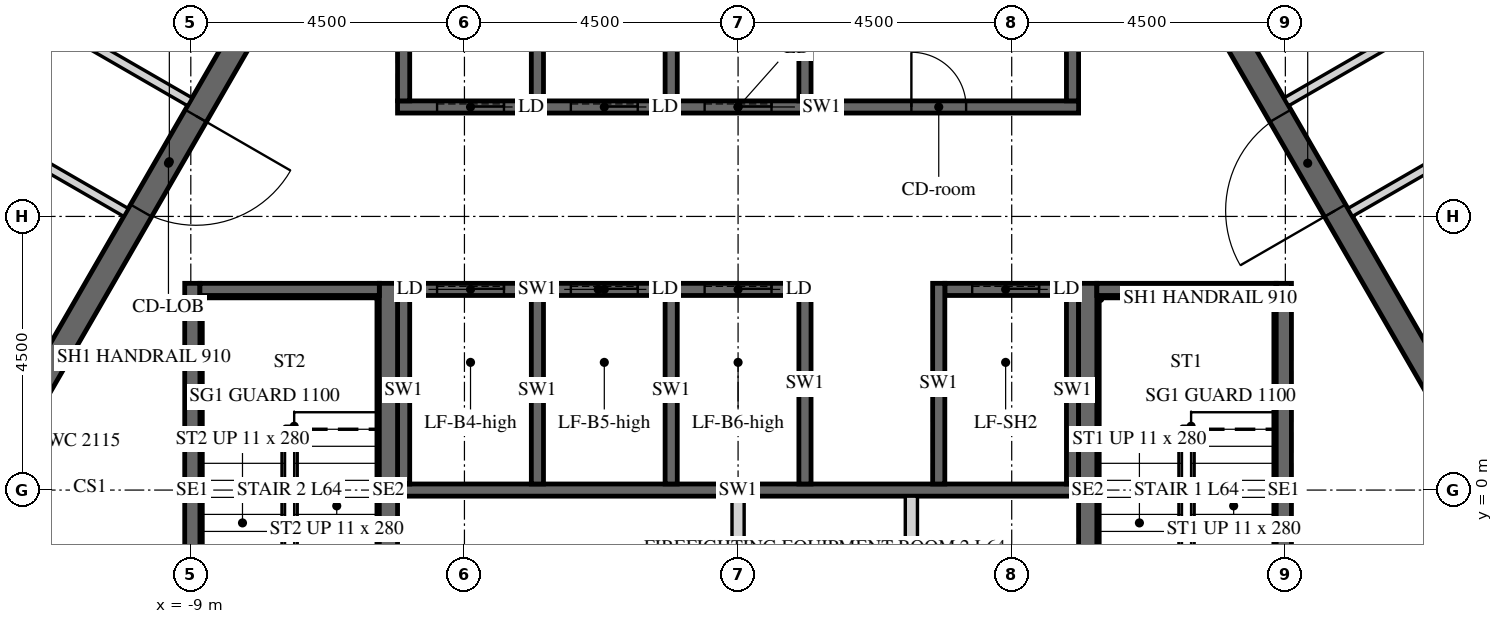
"""IFC4 building model, lengths in metres.
Left out: names, types, materials, properties, quantities, classifications, styles, units other than length and angle.
Written with IfcOpenShell. Run it as: python <this file> out.ifc"""

import sys

from ifc_helpers import new_model, si_unit, direction, frame, frame_2d, origin, place, context, subcontext, project, spatial, polyline, rectangle, outline, extrude, element, fill, save


model = new_model("IFC4")
c1 = context("Model", 3, precision=1e-05, world=origin(), true_north=direction((0.0, 1.0)))
c2 = subcontext(c1, "Body", "Model", "MODEL_VIEW")
j1 = project(units=[si_unit("LENGTHUNIT", "METRE"), si_unit("PLANEANGLEUNIT", "RADIAN")], contexts=[c1])
p1 = place(None, origin())
s1 = spatial("IfcSite", under=j1, at=p1, CompositionType="ELEMENT")
p2 = place(p1, origin())
s2 = spatial("IfcBuilding", under=s1, at=p2, CompositionType="ELEMENT")
p3 = place(p2, frame((0.0, 0.0, 267.9)))
s3 = spatial("IfcBuildingStorey", under=s2, at=p3, CompositionType="ELEMENT", Elevation=267.9)
p4 = place(p3, frame((-6.235, 10.8, -0.15), z_axis=(0.0, 0.0, 1.0), x_axis=(-0.499996419489, -0.866027470984, 0.0)))
e1 = element("IfcWall", 1, at=p4, inside=s3, PredefinedType="SHEAR", context=c2, shape_type="SweptSolid", body=[
    extrude(outline(polyline([(-0.115, -0.2), (12.586, -0.2), (12.355, 0.2), (0.115, 0.2), (-0.115, -0.2)])), origin(), (0.0, 0.0, 1.0), 3.9),
])
p5 = place(p4, frame((5.364, 0.0, 0.15)))
e2 = element("IfcOpeningElement", 2, at=p5, cuts=e1, PredefinedType="OPENING", context=c2, shape_type="SweptSolid", body=[
    extrude(rectangle(XDim=1.8, YDim=2.4, at=frame_2d((0.9, 1.2))), frame((0.0, 0.21, 0.0), z_axis=(0.0, -1.0, 0.0), x_axis=(1.0, 0.0, 0.0)), (0.0, 0.0, 1.0), 0.42),
])
p6 = place(p3, frame((-12.471, 0.0, -0.15), z_axis=(0.0, 0.0, 1.0), x_axis=(0.499996419489, -0.866027470984, 0.0)))
e3 = element("IfcWall", 3, at=p6, inside=s3, PredefinedType="SHEAR", context=c2, shape_type="SweptSolid", body=[
    extrude(outline(polyline([(-0.115, -0.2), (12.586, -0.2), (12.355, 0.2), (0.115, 0.2), (-0.115, -0.2)])), origin(), (0.0, 0.0, 1.0), 3.9),
])
p7 = place(p6, frame((5.306, 0.0, 0.15)))
e4 = element("IfcOpeningElement", 4, at=p7, cuts=e3, PredefinedType="OPENING", context=c2, shape_type="SweptSolid", body=[
    extrude(rectangle(XDim=1.8, YDim=2.4, at=frame_2d((0.9, 1.2))), frame((0.0, 0.21, 0.0), z_axis=(0.0, -1.0, 0.0), x_axis=(1.0, 0.0, 0.0)), (0.0, 0.0, 1.0), 0.42),
])
p8 = place(p3, frame((6.235, -10.8, -0.15), z_axis=(0.0, 0.0, 1.0), x_axis=(0.499996419489, 0.866027470984, 0.0)))
e5 = element("IfcWall", 5, at=p8, inside=s3, PredefinedType="SHEAR", context=c2, shape_type="SweptSolid", body=[
    extrude(outline(polyline([(-0.115, -0.2), (12.586, -0.2), (12.355, 0.2), (0.115, 0.2), (-0.115, -0.2)])), origin(), (0.0, 0.0, 1.0), 3.9),
])
p9 = place(p8, frame((5.364, 0.0, 0.15)))
e6 = element("IfcOpeningElement", 6, at=p9, cuts=e5, PredefinedType="OPENING", context=c2, shape_type="SweptSolid", body=[
    extrude(rectangle(XDim=1.8, YDim=2.4, at=frame_2d((0.9, 1.2))), frame((0.0, 0.21, 0.0), z_axis=(0.0, -1.0, 0.0), x_axis=(1.0, 0.0, 0.0)), (0.0, 0.0, 1.0), 0.42),
])
p10 = place(p3, frame((12.471, 0.0, -0.15), z_axis=(0.0, 0.0, 1.0), x_axis=(-0.499996419489, 0.866027470984, 0.0)))
e7 = element("IfcWall", 7, at=p10, inside=s3, PredefinedType="SHEAR", context=c2, shape_type="SweptSolid", body=[
    extrude(outline(polyline([(-0.115, -0.2), (12.586, -0.2), (12.355, 0.2), (0.115, 0.2), (-0.115, -0.2)])), origin(), (0.0, 0.0, 1.0), 3.9),
])
p11 = place(p10, frame((5.306, 0.0, 0.15)))
e8 = element("IfcOpeningElement", 8, at=p11, cuts=e7, PredefinedType="OPENING", context=c2, shape_type="SweptSolid", body=[
    extrude(rectangle(XDim=1.8, YDim=2.4, at=frame_2d((0.9, 1.2))), frame((0.0, 0.21, 0.0), z_axis=(0.0, -1.0, 0.0), x_axis=(1.0, 0.0, 0.0)), (0.0, 0.0, 1.0), 0.42),
])
p12 = place(p3, frame((-5.6, 6.3, -0.25), z_axis=(0.0, 0.0, 1.0), x_axis=(1.0, 0.0, 0.0)))
e9 = element("IfcWall", 9, at=p12, inside=s3, PredefinedType="SHEAR", context=c2, shape_type="SweptSolid", body=[
    extrude(rectangle(XDim=11.2, YDim=0.2, at=frame_2d((5.6, 0.0))), origin(), (0.0, 0.0, 1.0), 3.9),
])
p13 = place(p12, frame((8.45, 0.0, 0.25)))
e10 = element("IfcOpeningElement", 10, at=p13, cuts=e9, PredefinedType="OPENING", context=c2, shape_type="SweptSolid", body=[
    extrude(rectangle(XDim=0.9, YDim=2.1, at=frame_2d((0.45, 1.05))), frame((0.0, 0.11, 0.0), z_axis=(0.0, -1.0, 0.0), x_axis=(1.0, 0.0, 0.0)), (0.0, 0.0, 1.0), 0.22),
])
p14 = place(p12, frame((0.65, 0.0, 0.25)))
e11 = element("IfcOpeningElement", 11, at=p14, cuts=e9, PredefinedType="OPENING", context=c2, shape_type="SweptSolid", body=[
    extrude(rectangle(XDim=1.1, YDim=2.1, at=frame_2d((0.55, 1.05))), frame((0.0, 0.11, 0.0), z_axis=(0.0, -1.0, 0.0), x_axis=(1.0, 0.0, 0.0)), (0.0, 0.0, 1.0), 0.22),
])
p15 = place(p12, frame((2.85, 0.0, 0.25)))
e12 = element("IfcOpeningElement", 12, at=p15, cuts=e9, PredefinedType="OPENING", context=c2, shape_type="SweptSolid", body=[
    extrude(rectangle(XDim=1.1, YDim=2.1, at=frame_2d((0.55, 1.05))), frame((0.0, 0.11, 0.0), z_axis=(0.0, -1.0, 0.0), x_axis=(1.0, 0.0, 0.0)), (0.0, 0.0, 1.0), 0.22),
])
p16 = place(p12, frame((5.05, 0.0, 0.25)))
e13 = element("IfcOpeningElement", 13, at=p16, cuts=e9, PredefinedType="OPENING", context=c2, shape_type="SweptSolid", body=[
    extrude(rectangle(XDim=1.1, YDim=2.1, at=frame_2d((0.55, 1.05))), frame((0.0, 0.11, 0.0), z_axis=(0.0, -1.0, 0.0), x_axis=(1.0, 0.0, 0.0)), (0.0, 0.0, 1.0), 0.22),
])
for number, where, z_axis, x_axis in (
    (14, (-5.5, 6.4, -0.25), (0.0, 0.0, 1.0), (0.0, 1.0, 0.0)),
    (15, (-3.3, 6.4, -0.25), (0.0, 0.0, 1.0), (0.0, 1.0, 0.0)),
    (16, (-1.1, 6.4, -0.25), (0.0, 0.0, 1.0), (0.0, 1.0, 0.0)),
    (17, (1.1, 6.4, -0.25), (0.0, 0.0, 1.0), (0.0, 1.0, 0.0)),
    (18, (5.5, 6.4, -0.25), (0.0, 0.0, 1.0), (0.0, 1.0, 0.0)),
):
    element("IfcWall", number, at=place(p3, frame(where, z_axis=z_axis, x_axis=x_axis)), inside=s3, PredefinedType="SHEAR", context=c2, shape_type="SweptSolid", body=[
        extrude(rectangle(XDim=2.9, YDim=0.2, at=frame_2d((1.45, 0.0))), origin(), (0.0, 0.0, 1.0), 3.9),
    ])
p17 = place(p3, frame((-5.6, 3.3, -0.25), z_axis=(0.0, 0.0, 1.0), x_axis=(1.0, 0.0, 0.0)))
e19 = element("IfcWall", 19, at=p17, inside=s3, PredefinedType="SHEAR", context=c2, shape_type="SweptSolid", body=[
    extrude(rectangle(XDim=6.6, YDim=0.2, at=frame_2d((3.3, 0.0))), origin(), (0.0, 0.0, 1.0), 3.9),
])
p18 = place(p17, frame((0.65, 0.0, 0.25)))
e20 = element("IfcOpeningElement", 20, at=p18, cuts=e19, PredefinedType="OPENING", context=c2, shape_type="SweptSolid", body=[
    extrude(rectangle(XDim=1.1, YDim=2.1, at=frame_2d((0.55, 1.05))), frame((0.0, 0.11, 0.0), z_axis=(0.0, -1.0, 0.0), x_axis=(1.0, 0.0, 0.0)), (0.0, 0.0, 1.0), 0.22),
])
p19 = place(p17, frame((2.85, 0.0, 0.25)))
e21 = element("IfcOpeningElement", 21, at=p19, cuts=e19, PredefinedType="OPENING", context=c2, shape_type="SweptSolid", body=[
    extrude(rectangle(XDim=1.1, YDim=2.1, at=frame_2d((0.55, 1.05))), frame((0.0, 0.11, 0.0), z_axis=(0.0, -1.0, 0.0), x_axis=(1.0, 0.0, 0.0)), (0.0, 0.0, 1.0), 0.22),
])
p20 = place(p17, frame((5.05, 0.0, 0.25)))
e22 = element("IfcOpeningElement", 22, at=p20, cuts=e19, PredefinedType="OPENING", context=c2, shape_type="SweptSolid", body=[
    extrude(rectangle(XDim=1.1, YDim=2.1, at=frame_2d((0.55, 1.05))), frame((0.0, 0.11, 0.0), z_axis=(0.0, -1.0, 0.0), x_axis=(1.0, 0.0, 0.0)), (0.0, 0.0, 1.0), 0.22),
])
p21 = place(p3, frame((3.4, 3.3, -0.25), z_axis=(0.0, 0.0, 1.0), x_axis=(1.0, 0.0, 0.0)))
e23 = element("IfcWall", 23, at=p21, inside=s3, PredefinedType="SHEAR", context=c2, shape_type="SweptSolid", body=[
    extrude(rectangle(XDim=2.2, YDim=0.2, at=frame_2d((1.1, 0.0))), origin(), (0.0, 0.0, 1.0), 3.9),
])
p22 = place(p21, frame((0.45, 0.0, 0.25)))
e24 = element("IfcOpeningElement", 24, at=p22, cuts=e23, PredefinedType="OPENING", context=c2, shape_type="SweptSolid", body=[
    extrude(rectangle(XDim=1.1, YDim=2.1, at=frame_2d((0.55, 1.05))), frame((0.0, 0.11, 0.0), z_axis=(0.0, -1.0, 0.0), x_axis=(1.0, 0.0, 0.0)), (0.0, 0.0, 1.0), 0.22),
])
p23 = place(p3, frame((-5.6, 0.0, -0.25), z_axis=(0.0, 0.0, 1.0), x_axis=(1.0, 0.0, 0.0)))
e25 = element("IfcWall", 25, at=p23, inside=s3, PredefinedType="SHEAR", context=c2, shape_type="SweptSolid", body=[
    extrude(rectangle(XDim=11.2, YDim=0.2, at=frame_2d((5.6, 0.0))), origin(), (0.0, 0.0, 1.0), 3.9),
])
for number, where, z_axis, x_axis in (
    (26, (-5.5, 0.1, -0.25), (0.0, 0.0, 1.0), (0.0, 1.0, 0.0)),
    (27, (-3.3, 0.1, -0.25), (0.0, 0.0, 1.0), (0.0, 1.0, 0.0)),
    (28, (-1.1, 0.1, -0.25), (0.0, 0.0, 1.0), (0.0, 1.0, 0.0)),
):
    element("IfcWall", number, at=place(p3, frame(where, z_axis=z_axis, x_axis=x_axis)), inside=s3, PredefinedType="SHEAR", context=c2, shape_type="SweptSolid", body=[
        extrude(rectangle(XDim=3.1, YDim=0.2, at=frame_2d((1.55, 0.0))), origin(), (0.0, 0.0, 1.0), 3.9),
    ])
for number, where, z_axis, x_axis in (
    (29, (1.1, 0.1, -0.25), (0.0, 0.0, 1.0), (0.0, 1.0, 0.0)),
    (30, (3.3, 0.1, -0.25), (0.0, 0.0, 1.0), (0.0, 1.0, 0.0)),
):
    element("IfcWall", number, at=place(p3, frame(where, z_axis=z_axis, x_axis=x_axis)), inside=s3, PredefinedType="SHEAR", context=c2, shape_type="SweptSolid", body=[
        extrude(rectangle(XDim=3.3, YDim=0.2, at=frame_2d((1.65, 0.0))), origin(), (0.0, 0.0, 1.0), 3.9),
    ])
p24 = place(p3, frame((5.5, 0.1, -0.25), z_axis=(0.0, 0.0, 1.0), x_axis=(0.0, 1.0, 0.0)))
e31 = element("IfcWall", 31, at=p24, inside=s3, PredefinedType="SHEAR", context=c2, shape_type="SweptSolid", body=[
    extrude(rectangle(XDim=3.1, YDim=0.2, at=frame_2d((1.55, 0.0))), origin(), (0.0, 0.0, 1.0), 3.9),
])
p25 = place(p3, frame((2.85, -3.2, 0.0), z_axis=(0.0, 0.0, 1.0), x_axis=(0.0, 1.0, 0.0)))
e32 = element("IfcWall", 32, at=p25, inside=s3, PredefinedType="PARTITIONING", context=c2, shape_type="SweptSolid", body=[
    extrude(rectangle(XDim=3.1, YDim=0.2, at=frame_2d((1.55, 0.0))), origin(), (0.0, 0.0, 1.0), 3.65),
])
p26 = place(p3, frame((0.0, -6.2, 0.0), z_axis=(0.0, 0.0, 1.0), x_axis=(0.0, 1.0, 0.0)))
e33 = element("IfcWall", 33, at=p26, inside=s3, PredefinedType="PARTITIONING", context=c2, shape_type="SweptSolid", body=[
    extrude(rectangle(XDim=6.1, YDim=0.2, at=frame_2d((3.05, 0.0))), origin(), (0.0, 0.0, 1.0), 3.65),
])
p27 = place(p3, frame((5.75, -3.4, -0.25), z_axis=(0.0, 0.0, 1.0), x_axis=(0.0, 1.0, 0.0)))
e34 = element("IfcWall", 34, at=p27, inside=s3, PredefinedType="SHEAR", context=c2, shape_type="SweptSolid", body=[
    extrude(rectangle(XDim=6.8, YDim=0.3, at=frame_2d((3.4, 0.0))), origin(), (0.0, 0.0, 1.0), 3.9),
])
p28 = place(p3, frame((8.975, -3.4, -0.25), z_axis=(0.0, 0.0, 1.0), x_axis=(0.0, 1.0, 0.0)))
e35 = element("IfcWall", 35, at=p28, inside=s3, PredefinedType="SHEAR", context=c2, shape_type="SweptSolid", body=[
    extrude(rectangle(XDim=6.8, YDim=0.25, at=frame_2d((3.4, 0.0))), origin(), (0.0, 0.0, 1.0), 3.9),
])
p29 = place(p3, frame((5.9, 3.3, -0.25), z_axis=(0.0, 0.0, 1.0), x_axis=(1.0, 0.0, 0.0)))
e36 = element("IfcWall", 36, at=p29, inside=s3, PredefinedType="SHEAR", context=c2, shape_type="SweptSolid", body=[
    extrude(rectangle(XDim=2.95, YDim=0.2, at=frame_2d((1.475, 0.0))), origin(), (0.0, 0.0, 1.0), 3.9),
])
p30 = place(p3, frame((-5.75, -3.4, -0.25), z_axis=(0.0, 0.0, 1.0), x_axis=(0.0, 1.0, 0.0)))
e37 = element("IfcWall", 37, at=p30, inside=s3, PredefinedType="SHEAR", context=c2, shape_type="SweptSolid", body=[
    extrude(rectangle(XDim=6.8, YDim=0.3, at=frame_2d((3.4, 0.0))), origin(), (0.0, 0.0, 1.0), 3.9),
])
p31 = place(p3, frame((-8.975, -3.4, -0.25), z_axis=(0.0, 0.0, 1.0), x_axis=(0.0, 1.0, 0.0)))
e38 = element("IfcWall", 38, at=p31, inside=s3, PredefinedType="SHEAR", context=c2, shape_type="SweptSolid", body=[
    extrude(rectangle(XDim=6.8, YDim=0.25, at=frame_2d((3.4, 0.0))), origin(), (0.0, 0.0, 1.0), 3.9),
])
p32 = place(p3, frame((-8.85, 3.3, -0.25), z_axis=(0.0, 0.0, 1.0), x_axis=(1.0, 0.0, 0.0)))
e39 = element("IfcWall", 39, at=p32, inside=s3, PredefinedType="SHEAR", context=c2, shape_type="SweptSolid", body=[
    extrude(rectangle(XDim=2.95, YDim=0.2, at=frame_2d((1.475, 0.0))), origin(), (0.0, 0.0, 1.0), 3.9),
])
p33 = place(p3, frame((-8.434, 16.925, 0.0), z_axis=(0.0, 0.0, 1.0), x_axis=(-0.438371383278, -0.898793930956, 0.0)))
e40 = element("IfcWall", 40, at=p33, inside=s3, PredefinedType="PARTITIONING", context=c2, shape_type="SweptSolid", body=[
    extrude(rectangle(XDim=16.939, YDim=0.15, at=frame_2d((8.47, 0.0))), origin(), (0.0, 0.0, 1.0), 2.988),
])
p34 = place(p33, frame((3.89, 0.0, 0.0)))
e41 = element("IfcOpeningElement", 41, at=p34, cuts=e40, PredefinedType="OPENING", context=c2, shape_type="SweptSolid", body=[
    extrude(rectangle(XDim=1.0, YDim=2.1, at=frame_2d((0.5, 1.05))), frame((0.0, 0.085, 0.0), z_axis=(0.0, -1.0, 0.0), x_axis=(1.0, 0.0, 0.0)), (0.0, 0.0, 1.0), 0.17),
])
p35 = place(p3, frame((-9.016, 6.384, 0.0), z_axis=(0.0, 0.0, 1.0), x_axis=(-0.866031051173, 0.499990218309, 0.0)))
e42 = element("IfcWall", 42, at=p35, inside=s3, PredefinedType="PARTITIONING", context=c2, shape_type="SweptSolid", body=[
    extrude(rectangle(XDim=2.604, YDim=0.15, at=frame_2d((1.302, 0.0))), origin(), (0.0, 0.0, 1.0), 2.988),
])
p36 = place(p3, frame((-12.129, 5.757, 0.0), z_axis=(0.0, 0.0, 1.0), x_axis=(0.866033707122, -0.499985617921, 0.0)))
e43 = element("IfcWall", 43, at=p36, inside=s3, PredefinedType="PARTITIONING", context=c2, shape_type="SweptSolid", body=[
    extrude(rectangle(XDim=2.382, YDim=0.15, at=frame_2d((1.191, 0.0))), origin(), (0.0, 0.0, 1.0), 2.988),
])
p37 = place(p3, frame((18.875, -1.158, 0.0), z_axis=(0.0, 0.0, 1.0), x_axis=(-0.55919880344, 0.829033592945, 0.0)))
e44 = element("IfcWall", 44, at=p37, inside=s3, PredefinedType="PARTITIONING", context=c2, shape_type="SweptSolid", body=[
    extrude(rectangle(XDim=16.939, YDim=0.15, at=frame_2d((8.47, 0.0))), origin(), (0.0, 0.0, 1.0), 2.988),
])
p38 = place(p37, frame((9.69, 0.0, 0.0)))
e45 = element("IfcOpeningElement", 45, at=p38, cuts=e44, PredefinedType="OPENING", context=c2, shape_type="SweptSolid", body=[
    extrude(rectangle(XDim=1.0, YDim=2.1, at=frame_2d((0.5, 1.05))), frame((0.0, 0.085, 0.0), z_axis=(0.0, -1.0, 0.0), x_axis=(1.0, 0.0, 0.0)), (0.0, 0.0, 1.0), 0.17),
])
p39 = place(p3, frame((10.066, 4.566, 0.0), z_axis=(0.0, 0.0, 1.0), x_axis=(0.866034402474, 0.499984413489, 0.0)))
e46 = element("IfcWall", 46, at=p39, inside=s3, PredefinedType="PARTITIONING", context=c2, shape_type="SweptSolid", body=[
    extrude(rectangle(XDim=2.608, YDim=0.15, at=frame_2d((1.304, 0.0))), origin(), (0.0, 0.0, 1.0), 2.988),
])
p40 = place(p3, frame((11.082, 7.578, 0.0), z_axis=(0.0, 0.0, 1.0), x_axis=(-0.865993065409, -0.500056007527, 0.0)))
e47 = element("IfcWall", 47, at=p40, inside=s3, PredefinedType="PARTITIONING", context=c2, shape_type="SweptSolid", body=[
    extrude(rectangle(XDim=2.386, YDim=0.15, at=frame_2d((1.193, 0.0))), origin(), (0.0, 0.0, 1.0), 2.988),
])
p41 = place(p5, origin())
e48 = element("IfcDoor", 48, at=p41, inside=s3, OperationType="DOUBLE_DOOR_SINGLE_SWING", PredefinedType="DOOR", context=c2, shape_type="SweptSolid", body=[
    extrude(rectangle(XDim=1.8, YDim=2.4, at=frame_2d((0.9, 1.2))), frame((0.0, 0.025, 0.0), z_axis=(0.0, -1.0, 0.0), x_axis=(1.0, 0.0, 0.0)), (0.0, 0.0, 1.0), 0.05),
])
fill(e2, e48)
p42 = place(p11, origin())
e49 = element("IfcDoor", 49, at=p42, inside=s3, OperationType="DOUBLE_DOOR_SINGLE_SWING", PredefinedType="DOOR", context=c2, shape_type="SweptSolid", body=[
    extrude(rectangle(XDim=1.8, YDim=2.4, at=frame_2d((0.9, 1.2))), frame((0.0, 0.025, 0.0), z_axis=(0.0, -1.0, 0.0), x_axis=(1.0, 0.0, 0.0)), (0.0, 0.0, 1.0), 0.05),
])
fill(e8, e49)
p43 = place(p13, origin())
e50 = element("IfcDoor", 50, at=p43, inside=s3, OperationType="SINGLE_SWING_LEFT", PredefinedType="DOOR", context=c2, shape_type="SweptSolid", body=[
    extrude(rectangle(XDim=0.9, YDim=2.1, at=frame_2d((0.45, 1.05))), frame((0.0, 0.025, 0.0), z_axis=(0.0, -1.0, 0.0), x_axis=(1.0, 0.0, 0.0)), (0.0, 0.0, 1.0), 0.05),
])
fill(e10, e50)
p44 = place(p14, origin())
e51 = element("IfcDoor", 51, at=p44, inside=s3, OperationType="SLIDING_TO_LEFT", PredefinedType="DOOR", context=c2, shape_type="SweptSolid", body=[
    extrude(rectangle(XDim=1.1, YDim=2.1, at=frame_2d((0.55, 1.05))), frame((0.0, 0.025, 0.0), z_axis=(0.0, -1.0, 0.0), x_axis=(1.0, 0.0, 0.0)), (0.0, 0.0, 1.0), 0.05),
])
fill(e11, e51)
p45 = place(p15, origin())
e52 = element("IfcDoor", 52, at=p45, inside=s3, OperationType="SLIDING_TO_LEFT", PredefinedType="DOOR", context=c2, shape_type="SweptSolid", body=[
    extrude(rectangle(XDim=1.1, YDim=2.1, at=frame_2d((0.55, 1.05))), frame((0.0, 0.025, 0.0), z_axis=(0.0, -1.0, 0.0), x_axis=(1.0, 0.0, 0.0)), (0.0, 0.0, 1.0), 0.05),
])
fill(e12, e52)
p46 = place(p16, origin())
e53 = element("IfcDoor", 53, at=p46, inside=s3, OperationType="SLIDING_TO_LEFT", PredefinedType="DOOR", context=c2, shape_type="SweptSolid", body=[
    extrude(rectangle(XDim=1.1, YDim=2.1, at=frame_2d((0.55, 1.05))), frame((0.0, 0.025, 0.0), z_axis=(0.0, -1.0, 0.0), x_axis=(1.0, 0.0, 0.0)), (0.0, 0.0, 1.0), 0.05),
])
fill(e13, e53)
p47 = place(p18, origin())
e54 = element("IfcDoor", 54, at=p47, inside=s3, OperationType="SLIDING_TO_LEFT", PredefinedType="DOOR", context=c2, shape_type="SweptSolid", body=[
    extrude(rectangle(XDim=1.1, YDim=2.1, at=frame_2d((0.55, 1.05))), frame((0.0, 0.025, 0.0), z_axis=(0.0, -1.0, 0.0), x_axis=(1.0, 0.0, 0.0)), (0.0, 0.0, 1.0), 0.05),
])
fill(e20, e54)
p48 = place(p19, origin())
e55 = element("IfcDoor", 55, at=p48, inside=s3, OperationType="SLIDING_TO_LEFT", PredefinedType="DOOR", context=c2, shape_type="SweptSolid", body=[
    extrude(rectangle(XDim=1.1, YDim=2.1, at=frame_2d((0.55, 1.05))), frame((0.0, 0.025, 0.0), z_axis=(0.0, -1.0, 0.0), x_axis=(1.0, 0.0, 0.0)), (0.0, 0.0, 1.0), 0.05),
])
fill(e21, e55)
p49 = place(p20, origin())
e56 = element("IfcDoor", 56, at=p49, inside=s3, OperationType="SLIDING_TO_LEFT", PredefinedType="DOOR", context=c2, shape_type="SweptSolid", body=[
    extrude(rectangle(XDim=1.1, YDim=2.1, at=frame_2d((0.55, 1.05))), frame((0.0, 0.025, 0.0), z_axis=(0.0, -1.0, 0.0), x_axis=(1.0, 0.0, 0.0)), (0.0, 0.0, 1.0), 0.05),
])
fill(e22, e56)
p50 = place(p22, origin())
e57 = element("IfcDoor", 57, at=p50, inside=s3, OperationType="SLIDING_TO_LEFT", PredefinedType="DOOR", context=c2, shape_type="SweptSolid", body=[
    extrude(rectangle(XDim=1.1, YDim=2.1, at=frame_2d((0.55, 1.05))), frame((0.0, 0.025, 0.0), z_axis=(0.0, -1.0, 0.0), x_axis=(1.0, 0.0, 0.0)), (0.0, 0.0, 1.0), 0.05),
])
fill(e24, e57)
save(model, sys.argv[1])
